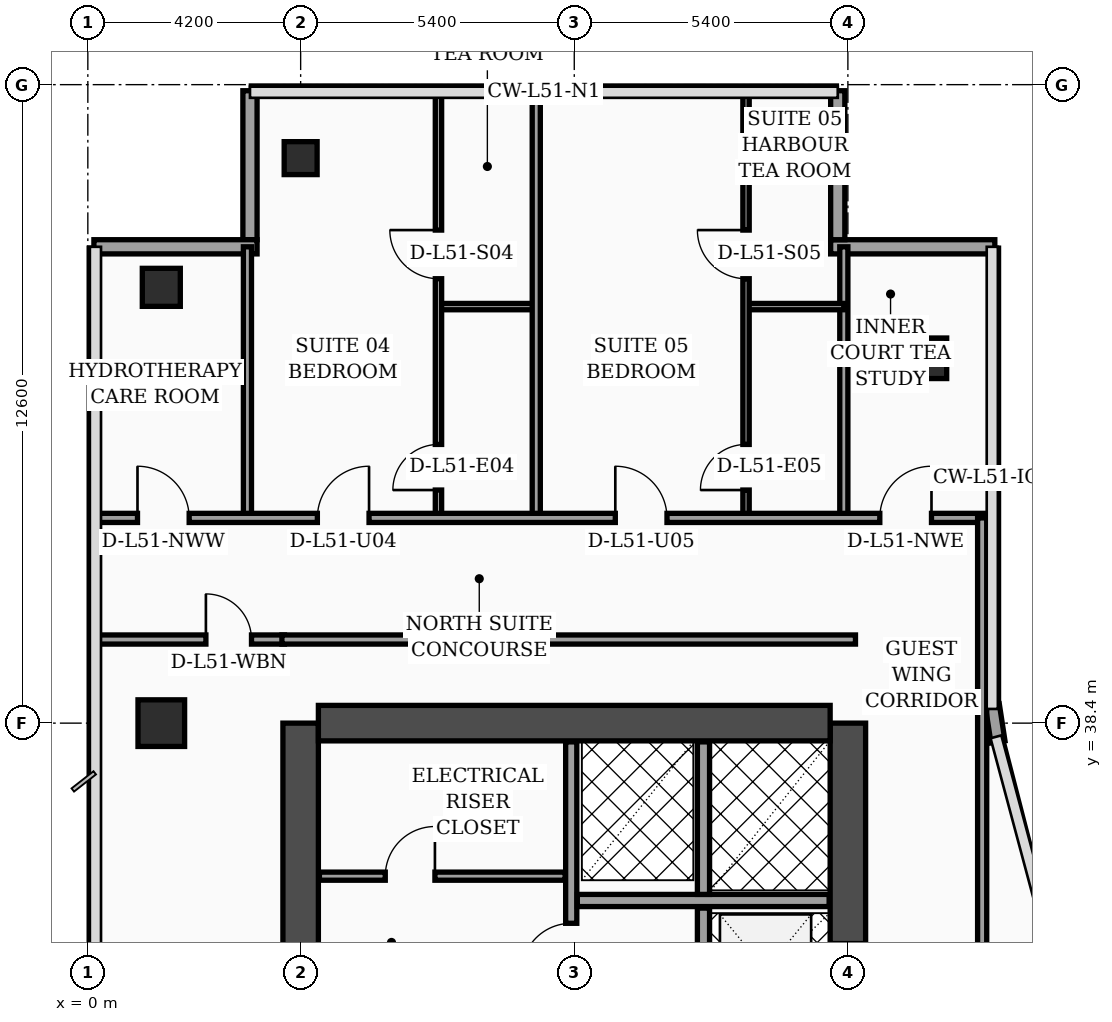
"""IFC4 building model, lengths in metres.
Left out: names, types, materials, properties, quantities, classifications, styles, units other than length and angle.
Written with IfcOpenShell. Run it as: python <this file> out.ifc"""

import sys

from ifc_helpers import new_model, si_unit, direction, frame, frame_2d, origin, origin_2d, place, context, subcontext, project, spatial, rectangle, hollow_rectangle, extrude, element, fill, save


model = new_model("IFC4")
c1 = context("Model", 3, precision=1e-05, world=origin(), true_north=direction((0.0, 1.0)))
c2 = subcontext(c1, "Body", "Model", "MODEL_VIEW")
j1 = project(units=[si_unit("LENGTHUNIT", "METRE"), si_unit("PLANEANGLEUNIT", "RADIAN")], contexts=[c1])
p1 = place(None, origin())
s1 = spatial("IfcSite", under=j1, at=p1, CompositionType="ELEMENT")
p2 = place(p1, origin())
s2 = spatial("IfcBuilding", under=s1, at=p2, CompositionType="ELEMENT")
p3 = place(p2, frame((0.0, 0.0, 207.2)))
s3 = spatial("IfcBuildingStorey", under=s2, at=p3, CompositionType="ELEMENT", Elevation=207.2)
p4 = place(p3, frame((4.2, 16.8, 0.0), z_axis=(0.0, 0.0, 1.0), x_axis=(0.0, 1.0, 0.0)))
e1 = element("IfcWall", 1, at=p4, inside=s3, PredefinedType="SHEAR", context=c2, shape_type="SweptSolid", body=[
    extrude(rectangle(XDim=21.6, YDim=0.7, at=frame_2d((10.8, 0.0))), origin(), (0.0, 0.0, 1.0), 3.56),
])
p5 = place(p3, frame((15.0, 16.8, 0.0), z_axis=(0.0, 0.0, 1.0), x_axis=(0.0, 1.0, 0.0)))
e2 = element("IfcWall", 2, at=p5, inside=s3, PredefinedType="SHEAR", context=c2, shape_type="SweptSolid", body=[
    extrude(rectangle(XDim=21.6, YDim=0.7, at=frame_2d((10.8, 0.0))), origin(), (0.0, 0.0, 1.0), 3.56),
])
p6 = place(p5, frame((8.65, 0.0, 0.0)))
e3 = element("IfcOpeningElement", 3, at=p6, cuts=e2, PredefinedType="OPENING", context=c2, shape_type="SweptSolid", body=[
    extrude(rectangle(XDim=1.1, YDim=2.2, at=frame_2d((0.55, 1.1))), frame((0.0, 0.36, 0.0), z_axis=(0.0, -1.0, 0.0), x_axis=(1.0, 0.0, 0.0)), (0.0, 0.0, 1.0), 0.72),
])
p7 = place(p5, frame((10.85, 0.0, 0.0)))
e4 = element("IfcOpeningElement", 4, at=p7, cuts=e2, PredefinedType="OPENING", context=c2, shape_type="SweptSolid", body=[
    extrude(rectangle(XDim=1.1, YDim=2.2, at=frame_2d((0.55, 1.1))), frame((0.0, 0.36, 0.0), z_axis=(0.0, -1.0, 0.0), x_axis=(1.0, 0.0, 0.0)), (0.0, 0.0, 1.0), 0.72),
])
p8 = place(p5, frame((13.5, 0.0, 0.0)))
e5 = element("IfcOpeningElement", 5, at=p8, cuts=e2, PredefinedType="OPENING", context=c2, shape_type="SweptSolid", body=[
    extrude(rectangle(XDim=1.1, YDim=2.2, at=frame_2d((0.55, 1.1))), frame((0.0, 0.36, 0.0), z_axis=(0.0, -1.0, 0.0), x_axis=(1.0, 0.0, 0.0)), (0.0, 0.0, 1.0), 0.72),
])
p9 = place(p5, frame((16.15, 0.0, 0.0)))
e6 = element("IfcOpeningElement", 6, at=p9, cuts=e2, PredefinedType="OPENING", context=c2, shape_type="SweptSolid", body=[
    extrude(rectangle(XDim=1.1, YDim=2.2, at=frame_2d((0.55, 1.1))), frame((0.0, 0.36, 0.0), z_axis=(0.0, -1.0, 0.0), x_axis=(1.0, 0.0, 0.0)), (0.0, 0.0, 1.0), 0.72),
])
p10 = place(p3, frame((4.55, 38.4, 0.0), z_axis=(0.0, 0.0, 1.0), x_axis=(1.0, 0.0, 0.0)))
e7 = element("IfcWall", 7, at=p10, inside=s3, PredefinedType="SHEAR", context=c2, shape_type="SweptSolid", body=[
    extrude(rectangle(XDim=10.1, YDim=0.7, at=frame_2d((5.05, 0.0))), origin(), (0.0, 0.0, 1.0), 3.56),
])
p11 = place(p3, frame((1.45, 38.4, 0.0), z_axis=(0.0, 0.0, 1.0), x_axis=(1.0, 0.0, 0.0)))
e8 = element("IfcColumn", 8, at=p11, inside=s3, PredefinedType="COLUMN", context=c2, shape_type="SweptSolid", body=[
    extrude(rectangle(XDim=0.92, YDim=0.92, at=origin_2d()), origin(), (0.0, 0.0, 1.0), 3.56),
])
p12 = place(p3, frame((1.45, 47.0, 0.0), z_axis=(0.0, 0.0, 1.0), x_axis=(1.0, 0.0, 0.0)))
e9 = element("IfcColumn", 9, at=p12, inside=s3, PredefinedType="COLUMN", context=c2, shape_type="SweptSolid", body=[
    extrude(hollow_rectangle(XDim=0.75, YDim=0.75, WallThickness=0.032, at=origin_2d()), origin(), (0.0, 0.0, 1.0), 3.56),
])
p13 = place(p3, frame((4.2, 49.55, 0.0), z_axis=(0.0, 0.0, 1.0), x_axis=(1.0, 0.0, 0.0)))
e10 = element("IfcColumn", 10, at=p13, inside=s3, PredefinedType="COLUMN", context=c2, shape_type="SweptSolid", body=[
    extrude(hollow_rectangle(XDim=0.65, YDim=0.65, WallThickness=0.028, at=origin_2d()), origin(), (0.0, 0.0, 1.0), 3.56),
])
p14 = place(p3, frame((16.55, 45.6, 0.0), z_axis=(0.0, 0.0, 1.0), x_axis=(1.0, 0.0, 0.0)))
e11 = element("IfcColumn", 11, at=p14, inside=s3, PredefinedType="COLUMN", context=c2, shape_type="SweptSolid", body=[
    extrude(rectangle(XDim=0.8, YDim=0.8, at=origin_2d()), origin(), (0.0, 0.0, 1.0), 3.56),
])
p15 = place(p3, frame((17.962, 38.03, 0.0), z_axis=(0.0, 0.0, 1.0), x_axis=(-0.15141125477, 0.988470855377, 0.0)))
e12 = element("IfcWall", 12, at=p15, inside=s3, PredefinedType="SOLIDWALL", context=c2, shape_type="SweptSolid", body=[
    extrude(rectangle(XDim=0.739, YDim=0.28, at=frame_2d((0.369, 0.0))), origin(), (0.0, 0.0, 1.0), 3.56),
])
p16 = place(p3, frame((17.9, 47.8, 0.0), z_axis=(0.0, 0.0, 1.0), x_axis=(-1.0, 0.0, 0.0)))
e13 = element("IfcWall", 13, at=p16, inside=s3, PredefinedType="SOLIDWALL", context=c2, shape_type="SweptSolid", body=[
    extrude(rectangle(XDim=3.24, YDim=0.28, at=frame_2d((1.62, 0.0))), origin(), (0.0, 0.0, 1.0), 3.56),
])
p17 = place(p3, frame((14.8, 47.94, 0.0), z_axis=(0.0, 0.0, 1.0), x_axis=(0.0, 1.0, 0.0)))
e14 = element("IfcWall", 14, at=p17, inside=s3, PredefinedType="SOLIDWALL", context=c2, shape_type="SweptSolid", body=[
    extrude(rectangle(XDim=2.94, YDim=0.28, at=frame_2d((1.47, 0.0))), origin(), (0.0, 0.0, 1.0), 3.56),
])
p18 = place(p3, frame((3.2, 50.88, 0.0), z_axis=(0.0, 0.0, 1.0), x_axis=(0.0, -1.0, 0.0)))
e15 = element("IfcWall", 15, at=p18, inside=s3, PredefinedType="SOLIDWALL", context=c2, shape_type="SweptSolid", body=[
    extrude(rectangle(XDim=2.94, YDim=0.28, at=frame_2d((1.47, 0.0))), origin(), (0.0, 0.0, 1.0), 3.09),
])
p19 = place(p3, frame((3.34, 47.8, 0.0), z_axis=(0.0, 0.0, 1.0), x_axis=(-1.0, 0.0, 0.0)))
e16 = element("IfcWall", 16, at=p19, inside=s3, PredefinedType="SOLIDWALL", context=c2, shape_type="SweptSolid", body=[
    extrude(rectangle(XDim=3.22, YDim=0.28, at=frame_2d((1.61, 0.0))), origin(), (0.0, 0.0, 1.0), 3.09),
])
p20 = place(p3, frame((4.57, 35.38, 0.0), z_axis=(0.0, 0.0, 1.0), x_axis=(1.0, 0.0, 0.0)))
e17 = element("IfcWall", 17, at=p20, inside=s3, PredefinedType="PARTITIONING", context=c2, shape_type="SweptSolid", body=[
    extrude(rectangle(XDim=4.85, YDim=0.16, at=frame_2d((2.425, 0.0))), origin(), (0.0, 0.0, 1.0), 3.56),
])
p21 = place(p20, frame((1.3, 0.0, 0.0)))
e18 = element("IfcOpeningElement", 18, at=p21, cuts=e17, PredefinedType="OPENING", context=c2, shape_type="SweptSolid", body=[
    extrude(rectangle(XDim=0.98, YDim=2.15, at=frame_2d((0.49, 1.075))), frame((0.0, 0.09, 0.0), z_axis=(0.0, -1.0, 0.0), x_axis=(1.0, 0.0, 0.0)), (0.0, 0.0, 1.0), 0.18),
])
p22 = place(p3, frame((9.54, 32.92, 0.0), z_axis=(0.0, 0.0, 1.0), x_axis=(0.0, 1.0, 0.0)))
e19 = element("IfcWall", 19, at=p22, inside=s3, PredefinedType="SOLIDWALL", context=c2, shape_type="SweptSolid", body=[
    extrude(rectangle(XDim=5.11, YDim=0.22, at=frame_2d((2.555, 0.0))), origin(), (0.0, 0.0, 1.0), 3.56),
])
p23 = place(p22, frame((0.55, 0.0, 0.0)))
e20 = element("IfcOpeningElement", 20, at=p23, cuts=e19, PredefinedType="OPENING", context=c2, shape_type="SweptSolid", body=[
    extrude(rectangle(XDim=0.98, YDim=2.15, at=frame_2d((0.49, 1.075))), frame((0.0, 0.12, 0.0), z_axis=(0.0, -1.0, 0.0), x_axis=(1.0, 0.0, 0.0)), (0.0, 0.0, 1.0), 0.24),
])
p24 = place(p3, frame((12.15, 27.0, 0.0), z_axis=(0.0, 0.0, 1.0), x_axis=(0.0, 1.0, 0.0)))
e21 = element("IfcWall", 21, at=p24, inside=s3, PredefinedType="SOLIDWALL", context=c2, shape_type="SweptSolid", body=[
    extrude(rectangle(XDim=7.75, YDim=0.24, at=frame_2d((3.875, 0.0))), origin(), (0.0, 0.0, 1.0), 3.56),
])
p25 = place(p3, frame((9.66, 34.9, 0.0), z_axis=(0.0, 0.0, 1.0), x_axis=(1.0, 0.0, 0.0)))
e22 = element("IfcWall", 22, at=p25, inside=s3, PredefinedType="SOLIDWALL", context=c2, shape_type="SweptSolid", body=[
    extrude(rectangle(XDim=4.97, YDim=0.24, at=frame_2d((2.485, 0.0))), origin(), (0.0, 0.0, 1.0), 3.56),
])
p26 = place(p3, frame((12.15, 35.02, 0.0), z_axis=(0.0, 0.0, 1.0), x_axis=(0.0, 1.0, 0.0)))
e23 = element("IfcWall", 23, at=p26, inside=s3, PredefinedType="SOLIDWALL", context=c2, shape_type="SweptSolid", body=[
    extrude(rectangle(XDim=3.01, YDim=0.24, at=frame_2d((1.505, 0.0))), origin(), (0.0, 0.0, 1.0), 3.56),
])
p27 = place(p3, frame((0.08, 40.05, 0.0), z_axis=(0.0, 0.0, 1.0), x_axis=(1.0, 0.0, 0.0)))
e24 = element("IfcWall", 24, at=p27, inside=s3, PredefinedType="PARTITIONING", context=c2, shape_type="SweptSolid", body=[
    extrude(rectangle(XDim=3.8, YDim=0.18, at=frame_2d((1.9, 0.0))), origin(), (0.0, 0.0, 1.0), 2.94),
])
p28 = place(p27, frame((2.25, 0.0, 0.0)))
e25 = element("IfcOpeningElement", 25, at=p28, cuts=e24, PredefinedType="OPENING", context=c2, shape_type="SweptSolid", body=[
    extrude(rectangle(XDim=0.9, YDim=2.15, at=frame_2d((0.45, 1.075))), frame((0.0, 0.1, 0.0), z_axis=(0.0, -1.0, 0.0), x_axis=(1.0, 0.0, 0.0)), (0.0, 0.0, 1.0), 0.2),
])
p29 = place(p3, frame((3.15, 42.45, 0.0), z_axis=(0.0, 0.0, 1.0), x_axis=(0.0, 1.0, 0.0)))
e26 = element("IfcWall", 26, at=p29, inside=s3, PredefinedType="PARTITIONING", context=c2, shape_type="SweptSolid", body=[
    extrude(rectangle(XDim=5.35, YDim=0.16, at=frame_2d((2.675, 0.0))), origin(), (0.0, 0.0, 1.0), 3.14),
])
p30 = place(p3, frame((14.92, 42.45, 0.0), z_axis=(0.0, 0.0, 1.0), x_axis=(0.0, 1.0, 0.0)))
e27 = element("IfcWall", 27, at=p30, inside=s3, PredefinedType="PARTITIONING", context=c2, shape_type="SweptSolid", body=[
    extrude(rectangle(XDim=5.35, YDim=0.16, at=frame_2d((2.675, 0.0))), origin(), (0.0, 0.0, 1.0), 3.09),
])
p31 = place(p3, frame((6.92, 46.62, 0.0), z_axis=(0.0, 0.0, 1.0), x_axis=(1.0, 0.0, 0.0)))
e28 = element("IfcWall", 28, at=p31, inside=s3, PredefinedType="PARTITIONING", context=c2, shape_type="SweptSolid", body=[
    extrude(rectangle(XDim=1.93, YDim=0.125, at=frame_2d((0.965, 0.0))), origin(), (0.0, 0.0, 1.0), 3.56),
])
p32 = place(p3, frame((6.92, 42.45, 0.0), z_axis=(0.0, 0.0, 1.0), x_axis=(0.0, 1.0, 0.0)))
e29 = element("IfcWall", 29, at=p32, inside=s3, PredefinedType="PARTITIONING", context=c2, shape_type="SweptSolid", body=[
    extrude(rectangle(XDim=8.49, YDim=0.125, at=frame_2d((4.245, 0.0))), origin(), (0.0, 0.0, 1.0), 3.09),
])
p33 = place(p32, frame((0.55, 0.0, 0.0)))
e30 = element("IfcOpeningElement", 30, at=p33, cuts=e29, PredefinedType="OPENING", context=c2, shape_type="SweptSolid", body=[
    extrude(rectangle(XDim=0.9, YDim=2.15, at=frame_2d((0.45, 1.075))), frame((0.0, 0.073, 0.0), z_axis=(0.0, -1.0, 0.0), x_axis=(1.0, 0.0, 0.0)), (0.0, 0.0, 1.0), 0.145),
])
p34 = place(p32, frame((4.72, 0.0, 0.0)))
e31 = element("IfcOpeningElement", 31, at=p34, cuts=e29, PredefinedType="OPENING", context=c2, shape_type="SweptSolid", body=[
    extrude(rectangle(XDim=0.96, YDim=2.2, at=frame_2d((0.48, 1.1))), frame((0.0, 0.073, 0.0), z_axis=(0.0, -1.0, 0.0), x_axis=(1.0, 0.0, 0.0)), (0.0, 0.0, 1.0), 0.145),
])
p35 = place(p3, frame((12.99, 46.62, 0.0), z_axis=(0.0, 0.0, 1.0), x_axis=(1.0, 0.0, 0.0)))
e32 = element("IfcWall", 32, at=p35, inside=s3, PredefinedType="PARTITIONING", context=c2, shape_type="SweptSolid", body=[
    extrude(rectangle(XDim=1.93, YDim=0.125, at=frame_2d((0.965, 0.0))), origin(), (0.0, 0.0, 1.0), 3.09),
])
p36 = place(p3, frame((12.99, 42.45, 0.0), z_axis=(0.0, 0.0, 1.0), x_axis=(0.0, 1.0, 0.0)))
e33 = element("IfcWall", 33, at=p36, inside=s3, PredefinedType="PARTITIONING", context=c2, shape_type="SweptSolid", body=[
    extrude(rectangle(XDim=8.49, YDim=0.125, at=frame_2d((4.245, 0.0))), origin(), (0.0, 0.0, 1.0), 3.09),
])
p37 = place(p36, frame((0.55, 0.0, 0.0)))
e34 = element("IfcOpeningElement", 34, at=p37, cuts=e33, PredefinedType="OPENING", context=c2, shape_type="SweptSolid", body=[
    extrude(rectangle(XDim=0.9, YDim=2.15, at=frame_2d((0.45, 1.075))), frame((0.0, 0.073, 0.0), z_axis=(0.0, -1.0, 0.0), x_axis=(1.0, 0.0, 0.0)), (0.0, 0.0, 1.0), 0.145),
])
p38 = place(p36, frame((4.72, 0.0, 0.0)))
e35 = element("IfcOpeningElement", 35, at=p38, cuts=e33, PredefinedType="OPENING", context=c2, shape_type="SweptSolid", body=[
    extrude(rectangle(XDim=0.96, YDim=2.2, at=frame_2d((0.48, 1.1))), frame((0.0, 0.073, 0.0), z_axis=(0.0, -1.0, 0.0), x_axis=(1.0, 0.0, 0.0)), (0.0, 0.0, 1.0), 0.145),
])
p39 = place(p3, frame((8.85, 42.45, 0.0), z_axis=(0.0, 0.0, 1.0), x_axis=(0.0, 1.0, 0.0)))
e36 = element("IfcWall", 36, at=p39, inside=s3, PredefinedType="PARTITIONING", context=c2, shape_type="SweptSolid", body=[
    extrude(rectangle(XDim=8.49, YDim=0.16, at=frame_2d((4.245, 0.0))), origin(), (0.0, 0.0, 1.0), 3.09),
])
p40 = place(p3, frame((0.08, 42.45, 0.0), z_axis=(0.0, 0.0, 1.0), x_axis=(1.0, 0.0, 0.0)))
e37 = element("IfcWall", 37, at=p40, inside=s3, PredefinedType="PARTITIONING", context=c2, shape_type="SweptSolid", body=[
    extrude(rectangle(XDim=17.77, YDim=0.18, at=frame_2d((8.885, 0.0))), origin(), (0.0, 0.0, 1.0), 2.94),
])
p41 = place(p40, frame((0.9, 0.0, 0.0)))
e38 = element("IfcOpeningElement", 38, at=p41, cuts=e37, PredefinedType="OPENING", context=c2, shape_type="SweptSolid", body=[
    extrude(rectangle(XDim=1.02, YDim=2.2, at=frame_2d((0.51, 1.1))), frame((0.0, 0.1, 0.0), z_axis=(0.0, -1.0, 0.0), x_axis=(1.0, 0.0, 0.0)), (0.0, 0.0, 1.0), 0.2),
])
p42 = place(p40, frame((4.45, 0.0, 0.0)))
e39 = element("IfcOpeningElement", 39, at=p42, cuts=e37, PredefinedType="OPENING", context=c2, shape_type="SweptSolid", body=[
    extrude(rectangle(XDim=1.02, YDim=2.2, at=frame_2d((0.51, 1.1))), frame((0.0, 0.1, 0.0), z_axis=(0.0, -1.0, 0.0), x_axis=(1.0, 0.0, 0.0)), (0.0, 0.0, 1.0), 0.2),
])
p43 = place(p40, frame((10.33, 0.0, 0.0)))
e40 = element("IfcOpeningElement", 40, at=p43, cuts=e37, PredefinedType="OPENING", context=c2, shape_type="SweptSolid", body=[
    extrude(rectangle(XDim=1.02, YDim=2.2, at=frame_2d((0.51, 1.1))), frame((0.0, 0.1, 0.0), z_axis=(0.0, -1.0, 0.0), x_axis=(1.0, 0.0, 0.0)), (0.0, 0.0, 1.0), 0.2),
])
p44 = place(p40, frame((15.55, 0.0, 0.0)))
e41 = element("IfcOpeningElement", 41, at=p44, cuts=e37, PredefinedType="OPENING", context=c2, shape_type="SweptSolid", body=[
    extrude(rectangle(XDim=1.02, YDim=2.2, at=frame_2d((0.51, 1.1))), frame((0.0, 0.1, 0.0), z_axis=(0.0, -1.0, 0.0), x_axis=(1.0, 0.0, 0.0)), (0.0, 0.0, 1.0), 0.2),
])
p45 = place(p3, frame((17.65, 24.3, 0.0), z_axis=(0.0, 0.0, 1.0), x_axis=(0.0, 1.0, 0.0)))
e42 = element("IfcWall", 42, at=p45, inside=s3, PredefinedType="PARTITIONING", context=c2, shape_type="SweptSolid", body=[
    extrude(rectangle(XDim=18.15, YDim=0.18, at=frame_2d((9.075, 0.0))), origin(), (0.0, 0.0, 1.0), 2.94),
])
p46 = place(p3, frame((3.83, 40.05, 0.0), z_axis=(0.0, 0.0, 1.0), x_axis=(1.0, 0.0, 0.0)))
e43 = element("IfcWall", 43, at=p46, inside=s3, PredefinedType="PARTITIONING", context=c2, shape_type="SweptSolid", body=[
    extrude(rectangle(XDim=11.32, YDim=0.18, at=frame_2d((5.66, 0.0))), origin(), (0.0, 0.0, 1.0), 2.94),
])
p47 = place(p21, origin())
e44 = element("IfcDoor", 44, at=p47, inside=s3, OperationType="SINGLE_SWING_RIGHT", PredefinedType="DOOR", context=c2, shape_type="SweptSolid", body=[
    extrude(rectangle(XDim=0.98, YDim=2.15, at=frame_2d((0.49, 1.075))), frame((0.0, 0.025, 0.0), z_axis=(0.0, -1.0, 0.0), x_axis=(1.0, 0.0, 0.0)), (0.0, 0.0, 1.0), 0.05),
])
fill(e18, e44)
p48 = place(p23, origin())
e45 = element("IfcDoor", 45, at=p48, inside=s3, OperationType="SINGLE_SWING_LEFT", PredefinedType="DOOR", context=c2, shape_type="SweptSolid", body=[
    extrude(rectangle(XDim=0.98, YDim=2.15, at=frame_2d((0.49, 1.075))), frame((0.0, 0.025, 0.0), z_axis=(0.0, -1.0, 0.0), x_axis=(1.0, 0.0, 0.0)), (0.0, 0.0, 1.0), 0.05),
])
fill(e20, e45)
p49 = place(p28, origin())
e46 = element("IfcDoor", 46, at=p49, inside=s3, OperationType="SINGLE_SWING_LEFT", PredefinedType="DOOR", context=c2, shape_type="SweptSolid", body=[
    extrude(rectangle(XDim=0.9, YDim=2.15, at=frame_2d((0.45, 1.075))), frame((0.0, 0.025, 0.0), z_axis=(0.0, -1.0, 0.0), x_axis=(1.0, 0.0, 0.0)), (0.0, 0.0, 1.0), 0.05),
])
fill(e25, e46)
p50 = place(p33, origin())
e47 = element("IfcDoor", 47, at=p50, inside=s3, OperationType="SINGLE_SWING_LEFT", PredefinedType="DOOR", context=c2, shape_type="SweptSolid", body=[
    extrude(rectangle(XDim=0.9, YDim=2.15, at=frame_2d((0.45, 1.075))), frame((0.0, 0.025, 0.0), z_axis=(0.0, -1.0, 0.0), x_axis=(1.0, 0.0, 0.0)), (0.0, 0.0, 1.0), 0.05),
])
fill(e30, e47)
p51 = place(p34, origin())
e48 = element("IfcDoor", 48, at=p51, inside=s3, OperationType="SINGLE_SWING_RIGHT", PredefinedType="DOOR", context=c2, shape_type="SweptSolid", body=[
    extrude(rectangle(XDim=0.96, YDim=2.2, at=frame_2d((0.48, 1.1))), frame((0.0, 0.025, 0.0), z_axis=(0.0, -1.0, 0.0), x_axis=(1.0, 0.0, 0.0)), (0.0, 0.0, 1.0), 0.05),
])
fill(e31, e48)
p52 = place(p37, origin())
e49 = element("IfcDoor", 49, at=p52, inside=s3, OperationType="SINGLE_SWING_LEFT", PredefinedType="DOOR", context=c2, shape_type="SweptSolid", body=[
    extrude(rectangle(XDim=0.9, YDim=2.15, at=frame_2d((0.45, 1.075))), frame((0.0, 0.025, 0.0), z_axis=(0.0, -1.0, 0.0), x_axis=(1.0, 0.0, 0.0)), (0.0, 0.0, 1.0), 0.05),
])
fill(e34, e49)
p53 = place(p38, origin())
e50 = element("IfcDoor", 50, at=p53, inside=s3, OperationType="SINGLE_SWING_RIGHT", PredefinedType="DOOR", context=c2, shape_type="SweptSolid", body=[
    extrude(rectangle(XDim=0.96, YDim=2.2, at=frame_2d((0.48, 1.1))), frame((0.0, 0.025, 0.0), z_axis=(0.0, -1.0, 0.0), x_axis=(1.0, 0.0, 0.0)), (0.0, 0.0, 1.0), 0.05),
])
fill(e35, e50)
p54 = place(p41, origin())
e51 = element("IfcDoor", 51, at=p54, inside=s3, OperationType="SINGLE_SWING_LEFT", PredefinedType="DOOR", context=c2, shape_type="SweptSolid", body=[
    extrude(rectangle(XDim=1.02, YDim=2.2, at=frame_2d((0.51, 1.1))), frame((0.0, 0.025, 0.0), z_axis=(0.0, -1.0, 0.0), x_axis=(1.0, 0.0, 0.0)), (0.0, 0.0, 1.0), 0.05),
])
fill(e38, e51)
p55 = place(p42, origin())
e52 = element("IfcDoor", 52, at=p55, inside=s3, OperationType="SINGLE_SWING_RIGHT", PredefinedType="DOOR", context=c2, shape_type="SweptSolid", body=[
    extrude(rectangle(XDim=1.02, YDim=2.2, at=frame_2d((0.51, 1.1))), frame((0.0, 0.025, 0.0), z_axis=(0.0, -1.0, 0.0), x_axis=(1.0, 0.0, 0.0)), (0.0, 0.0, 1.0), 0.05),
])
fill(e39, e52)
p56 = place(p43, origin())
e53 = element("IfcDoor", 53, at=p56, inside=s3, OperationType="SINGLE_SWING_LEFT", PredefinedType="DOOR", context=c2, shape_type="SweptSolid", body=[
    extrude(rectangle(XDim=1.02, YDim=2.2, at=frame_2d((0.51, 1.1))), frame((0.0, 0.025, 0.0), z_axis=(0.0, -1.0, 0.0), x_axis=(1.0, 0.0, 0.0)), (0.0, 0.0, 1.0), 0.05),
])
fill(e40, e53)
p57 = place(p44, origin())
e54 = element("IfcDoor", 54, at=p57, inside=s3, OperationType="SINGLE_SWING_RIGHT", PredefinedType="DOOR", context=c2, shape_type="SweptSolid", body=[
    extrude(rectangle(XDim=1.02, YDim=2.2, at=frame_2d((0.51, 1.1))), frame((0.0, 0.025, 0.0), z_axis=(0.0, -1.0, 0.0), x_axis=(1.0, 0.0, 0.0)), (0.0, 0.0, 1.0), 0.05),
])
fill(e41, e54)
save(model, sys.argv[1])
